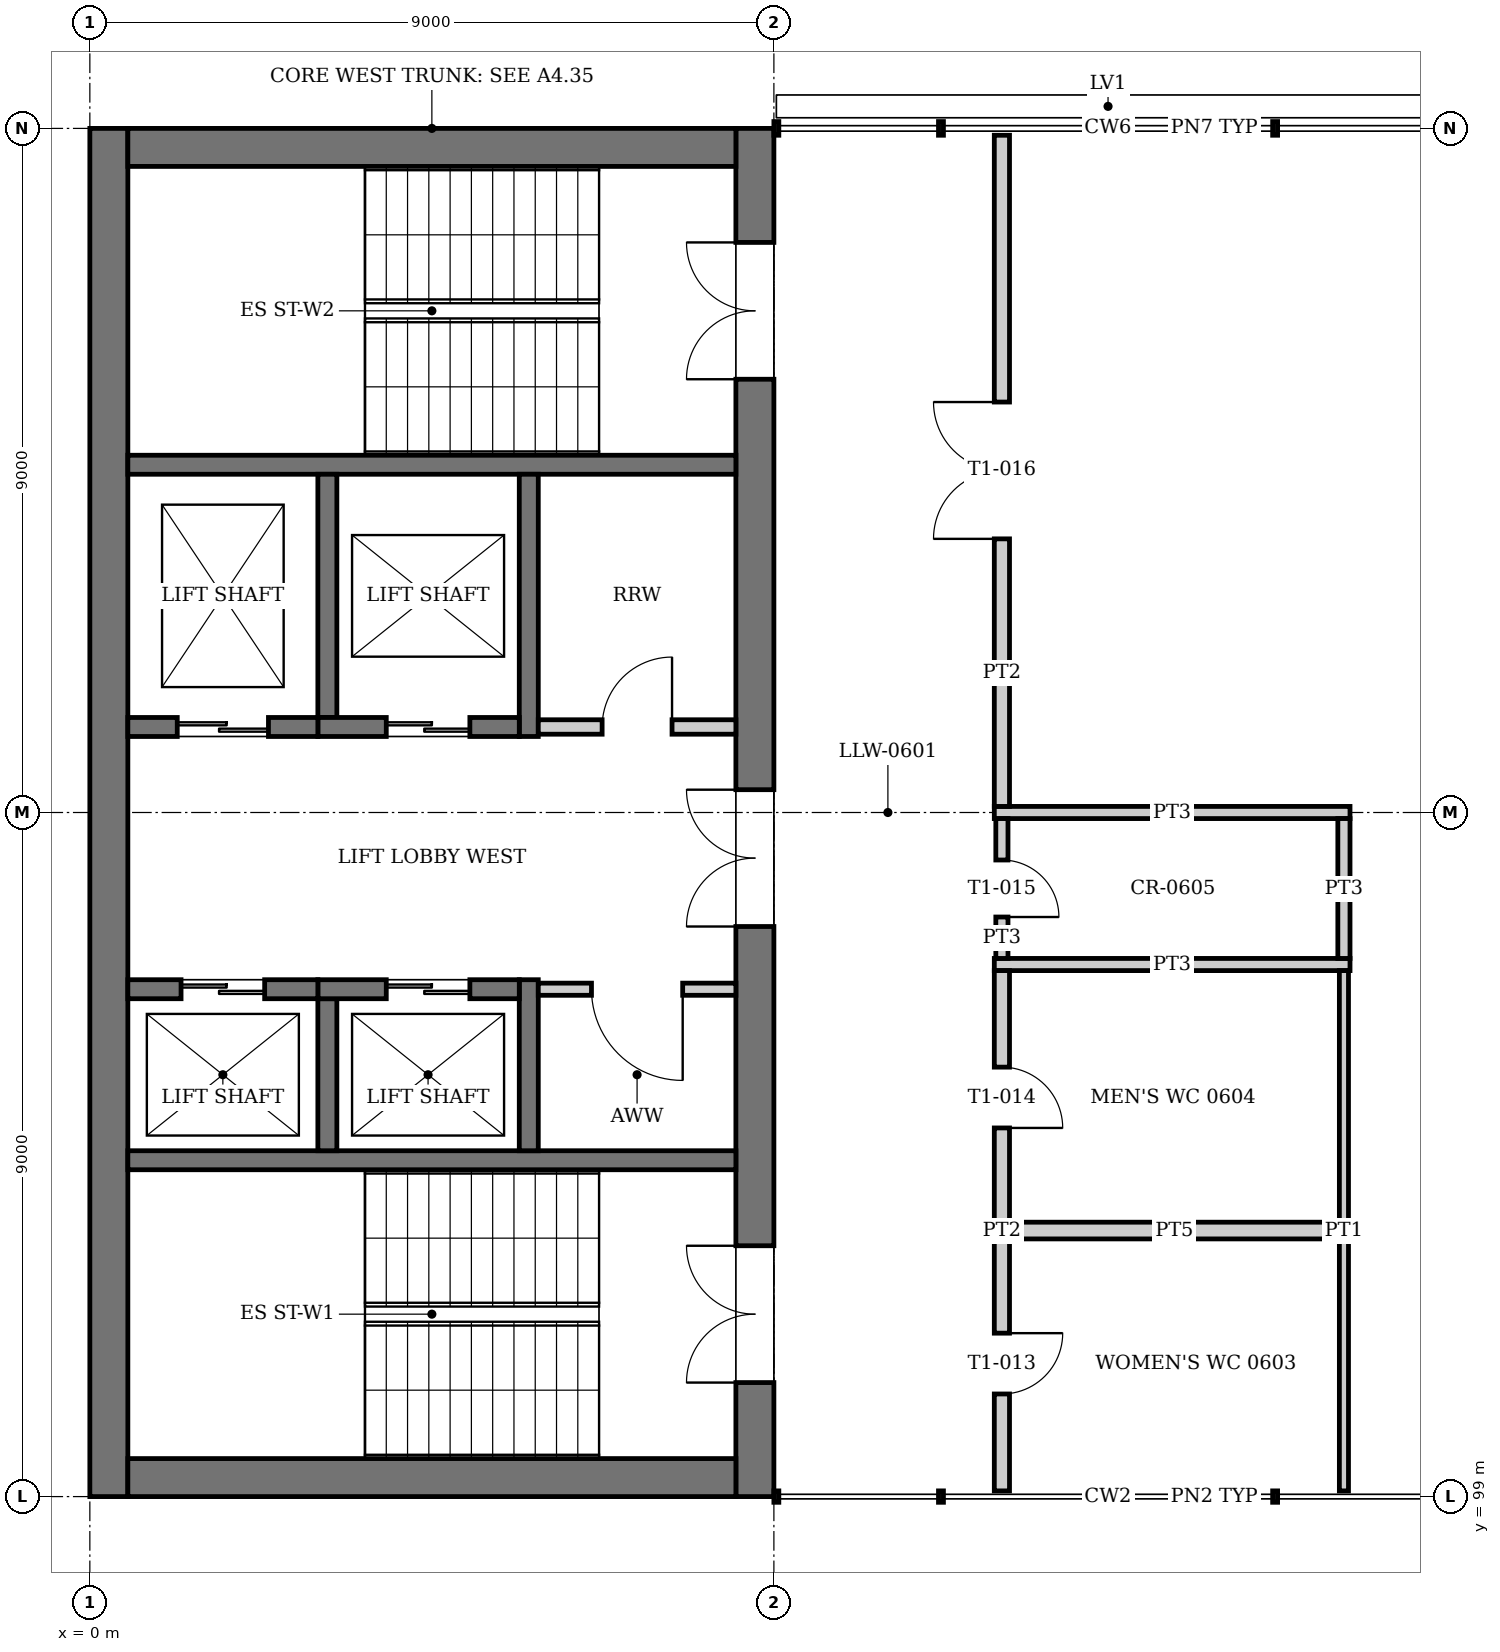
"""IFC4 building model, lengths in metres.
Left out: names, types, materials, properties, quantities, classifications, styles, units other than length and angle.
Written with IfcOpenShell. Run it as: python <this file> out.ifc"""

import sys

from ifc_helpers import new_model, si_unit, direction, frame, frame_2d, origin, place, context, subcontext, project, spatial, rectangle, extrude, element, fill, save


model = new_model("IFC4")
c1 = context("Model", 3, precision=1e-05, world=origin(), true_north=direction((0.0, 1.0)))
c2 = subcontext(c1, "Body", "Model", "MODEL_VIEW")
j1 = project(units=[si_unit("LENGTHUNIT", "METRE"), si_unit("PLANEANGLEUNIT", "RADIAN")], contexts=[c1])
p1 = place(None, origin())
s1 = spatial("IfcSite", under=j1, at=p1, CompositionType="ELEMENT")
p2 = place(p1, origin())
s2 = spatial("IfcBuilding", under=s1, at=p2, CompositionType="ELEMENT")
p3 = place(p2, frame((0.0, 0.0, 27.2)))
s3 = spatial("IfcBuildingStorey", under=s2, at=p3, CompositionType="ELEMENT", Elevation=27.2)
p4 = place(p3, frame((0.25, 99.0, 0.0), z_axis=(0.0, 0.0, 1.0), x_axis=(0.0, 1.0, 0.0)))
e1 = element("IfcWall", 1, at=p4, inside=s3, PredefinedType="SHEAR", context=c2, shape_type="SweptSolid", body=[
    extrude(rectangle(XDim=18.0, YDim=0.5, at=frame_2d((9.0, 0.0))), origin(), (0.0, 0.0, 1.0), 4.0),
])
p5 = place(p3, frame((8.75, 99.0, 0.0), z_axis=(0.0, 0.0, 1.0), x_axis=(0.0, 1.0, 0.0)))
e2 = element("IfcWall", 2, at=p5, inside=s3, PredefinedType="SHEAR", context=c2, shape_type="SweptSolid", body=[
    extrude(rectangle(XDim=18.0, YDim=0.5, at=frame_2d((9.0, 0.0))), origin(), (0.0, 0.0, 1.0), 4.0),
])
p6 = place(p5, frame((1.5, 0.0, 0.0)))
e3 = element("IfcOpeningElement", 3, at=p6, cuts=e2, PredefinedType="OPENING", context=c2, shape_type="SweptSolid", body=[
    extrude(rectangle(XDim=1.8, YDim=2.1, at=frame_2d((0.9, 1.05))), frame((0.0, 0.26, 0.0), z_axis=(0.0, -1.0, 0.0), x_axis=(1.0, 0.0, 0.0)), (0.0, 0.0, 1.0), 0.52),
])
p7 = place(p5, frame((14.7, 0.0, 0.0)))
e4 = element("IfcOpeningElement", 4, at=p7, cuts=e2, PredefinedType="OPENING", context=c2, shape_type="SweptSolid", body=[
    extrude(rectangle(XDim=1.8, YDim=2.1, at=frame_2d((0.9, 1.05))), frame((0.0, 0.26, 0.0), z_axis=(0.0, -1.0, 0.0), x_axis=(1.0, 0.0, 0.0)), (0.0, 0.0, 1.0), 0.52),
])
p8 = place(p5, frame((7.5, 0.0, 0.0)))
e5 = element("IfcOpeningElement", 5, at=p8, cuts=e2, PredefinedType="OPENING", context=c2, shape_type="SweptSolid", body=[
    extrude(rectangle(XDim=1.8, YDim=2.1, at=frame_2d((0.9, 1.05))), frame((0.0, 0.26, 0.0), z_axis=(0.0, -1.0, 0.0), x_axis=(1.0, 0.0, 0.0)), (0.0, 0.0, 1.0), 0.52),
])
for number, where, z_axis, x_axis in (
    (6, (0.5, 99.25, 0.0), (0.0, 0.0, 1.0), (1.0, 0.0, 0.0)),
    (7, (0.5, 116.75, 0.0), (0.0, 0.0, 1.0), (1.0, 0.0, 0.0)),
):
    element("IfcWall", number, at=place(p3, frame(where, z_axis=z_axis, x_axis=x_axis)), inside=s3, PredefinedType="SHEAR", context=c2, shape_type="SweptSolid", body=[
        extrude(rectangle(XDim=8.0, YDim=0.5, at=frame_2d((4.0, 0.0))), origin(), (0.0, 0.0, 1.0), 4.0),
    ])
for number, where, z_axis, x_axis in (
    (8, (8.5, 103.425, 0.0), (0.0, 0.0, 1.0), (-1.0, 0.0, 0.0)),
    (9, (8.5, 112.575, 0.0), (0.0, 0.0, 1.0), (-1.0, 0.0, 0.0)),
):
    element("IfcWall", number, at=place(p3, frame(where, z_axis=z_axis, x_axis=x_axis)), inside=s3, PredefinedType="SOLIDWALL", context=c2, shape_type="SweptSolid", body=[
        extrude(rectangle(XDim=8.0, YDim=0.25, at=frame_2d((4.0, 0.0))), origin(), (0.0, 0.0, 1.0), 3.75),
    ])
p9 = place(p3, frame((5.775, 103.55, 0.0), z_axis=(0.0, 0.0, 1.0), x_axis=(0.0, 1.0, 0.0)))
e10 = element("IfcWall", 10, at=p9, inside=s3, PredefinedType="SOLIDWALL", context=c2, shape_type="SweptSolid", body=[
    extrude(rectangle(XDim=2.25, YDim=0.25, at=frame_2d((1.125, 0.0))), origin(), (0.0, 0.0, 1.0), 4.0),
])
p10 = place(p3, frame((3.125, 103.55, 0.0), z_axis=(0.0, 0.0, 1.0), x_axis=(0.0, 1.0, 0.0)))
e11 = element("IfcWall", 11, at=p10, inside=s3, PredefinedType="SOLIDWALL", context=c2, shape_type="SweptSolid", body=[
    extrude(rectangle(XDim=2.0, YDim=0.25, at=frame_2d((1.0, 0.0))), origin(), (0.0, 0.0, 1.0), 4.0),
])
p11 = place(p3, frame((5.65, 105.675, 0.0), z_axis=(0.0, 0.0, 1.0), x_axis=(-1.0, 0.0, 0.0)))
e12 = element("IfcWall", 12, at=p11, inside=s3, PredefinedType="SOLIDWALL", context=c2, shape_type="SweptSolid", body=[
    extrude(rectangle(XDim=2.65, YDim=0.25, at=frame_2d((1.325, 0.0))), origin(), (0.0, 0.0, 1.0), 4.0),
])
p12 = place(p11, frame((0.65, 0.0, 0.0)))
e13 = element("IfcOpeningElement", 13, at=p12, cuts=e12, PredefinedType="OPENING", context=c2, shape_type="SweptSolid", body=[
    extrude(rectangle(XDim=1.1, YDim=2.1, at=frame_2d((0.55, 1.05))), frame((0.0, 0.135, 0.0), z_axis=(0.0, -1.0, 0.0), x_axis=(1.0, 0.0, 0.0)), (0.0, 0.0, 1.0), 0.27),
])
p13 = place(p3, frame((3.0, 105.675, 0.0), z_axis=(0.0, 0.0, 1.0), x_axis=(-1.0, 0.0, 0.0)))
e14 = element("IfcWall", 14, at=p13, inside=s3, PredefinedType="SOLIDWALL", context=c2, shape_type="SweptSolid", body=[
    extrude(rectangle(XDim=2.5, YDim=0.25, at=frame_2d((1.25, 0.0))), origin(), (0.0, 0.0, 1.0), 4.0),
])
p14 = place(p13, frame((0.7, 0.0, 0.0)))
e15 = element("IfcOpeningElement", 15, at=p14, cuts=e14, PredefinedType="OPENING", context=c2, shape_type="SweptSolid", body=[
    extrude(rectangle(XDim=1.1, YDim=2.1, at=frame_2d((0.55, 1.05))), frame((0.0, 0.135, 0.0), z_axis=(0.0, -1.0, 0.0), x_axis=(1.0, 0.0, 0.0)), (0.0, 0.0, 1.0), 0.27),
])
p15 = place(p3, frame((5.775, 109.0, 0.0), z_axis=(0.0, 0.0, 1.0), x_axis=(0.0, 1.0, 0.0)))
e16 = element("IfcWall", 16, at=p15, inside=s3, PredefinedType="SOLIDWALL", context=c2, shape_type="SweptSolid", body=[
    extrude(rectangle(XDim=3.45, YDim=0.25, at=frame_2d((1.725, 0.0))), origin(), (0.0, 0.0, 1.0), 4.0),
])
p16 = place(p3, frame((3.125, 109.25, 0.0), z_axis=(0.0, 0.0, 1.0), x_axis=(0.0, 1.0, 0.0)))
e17 = element("IfcWall", 17, at=p16, inside=s3, PredefinedType="SOLIDWALL", context=c2, shape_type="SweptSolid", body=[
    extrude(rectangle(XDim=3.2, YDim=0.25, at=frame_2d((1.6, 0.0))), origin(), (0.0, 0.0, 1.0), 4.0),
])
p17 = place(p3, frame((5.65, 109.125, 0.0), z_axis=(0.0, 0.0, 1.0), x_axis=(-1.0, 0.0, 0.0)))
e18 = element("IfcWall", 18, at=p17, inside=s3, PredefinedType="SOLIDWALL", context=c2, shape_type="SweptSolid", body=[
    extrude(rectangle(XDim=2.65, YDim=0.25, at=frame_2d((1.325, 0.0))), origin(), (0.0, 0.0, 1.0), 4.0),
])
p18 = place(p17, frame((0.65, 0.0, 0.0)))
e19 = element("IfcOpeningElement", 19, at=p18, cuts=e18, PredefinedType="OPENING", context=c2, shape_type="SweptSolid", body=[
    extrude(rectangle(XDim=1.1, YDim=2.1, at=frame_2d((0.55, 1.05))), frame((0.0, 0.135, 0.0), z_axis=(0.0, -1.0, 0.0), x_axis=(1.0, 0.0, 0.0)), (0.0, 0.0, 1.0), 0.27),
])
p19 = place(p3, frame((3.0, 109.125, 0.0), z_axis=(0.0, 0.0, 1.0), x_axis=(-1.0, 0.0, 0.0)))
e20 = element("IfcWall", 20, at=p19, inside=s3, PredefinedType="SOLIDWALL", context=c2, shape_type="SweptSolid", body=[
    extrude(rectangle(XDim=2.5, YDim=0.25, at=frame_2d((1.25, 0.0))), origin(), (0.0, 0.0, 1.0), 4.0),
])
p20 = place(p19, frame((0.65, 0.0, 0.0)))
e21 = element("IfcOpeningElement", 21, at=p20, cuts=e20, PredefinedType="OPENING", context=c2, shape_type="SweptSolid", body=[
    extrude(rectangle(XDim=1.2, YDim=2.1, at=frame_2d((0.6, 1.05))), frame((0.0, 0.135, 0.0), z_axis=(0.0, -1.0, 0.0), x_axis=(1.0, 0.0, 0.0)), (0.0, 0.0, 1.0), 0.27),
])
p21 = place(p3, frame((8.5, 105.675, 0.0), z_axis=(0.0, 0.0, 1.0), x_axis=(-1.0, 0.0, 0.0)))
e22 = element("IfcWall", 22, at=p21, inside=s3, PredefinedType="PARTITIONING", context=c2, shape_type="SweptSolid", body=[
    extrude(rectangle(XDim=2.6, YDim=0.16, at=frame_2d((1.3, 0.0))), origin(), (0.0, 0.0, 1.0), 3.75),
])
p22 = place(p21, frame((0.7, 0.0, 0.0)))
e23 = element("IfcOpeningElement", 23, at=p22, cuts=e22, PredefinedType="OPENING", context=c2, shape_type="SweptSolid", body=[
    extrude(rectangle(XDim=1.2, YDim=2.1, at=frame_2d((0.6, 1.05))), frame((0.0, 0.09, 0.0), z_axis=(0.0, -1.0, 0.0), x_axis=(1.0, 0.0, 0.0)), (0.0, 0.0, 1.0), 0.18),
])
p23 = place(p3, frame((8.5, 109.125, 0.0), z_axis=(0.0, 0.0, 1.0), x_axis=(-1.0, 0.0, 0.0)))
e24 = element("IfcWall", 24, at=p23, inside=s3, PredefinedType="PARTITIONING", context=c2, shape_type="SweptSolid", body=[
    extrude(rectangle(XDim=2.6, YDim=0.19, at=frame_2d((1.3, 0.0))), origin(), (0.0, 0.0, 1.0), 3.75),
])
p24 = place(p23, frame((0.84, 0.0, 0.0)))
e25 = element("IfcOpeningElement", 25, at=p24, cuts=e24, PredefinedType="OPENING", context=c2, shape_type="SweptSolid", body=[
    extrude(rectangle(XDim=0.92, YDim=2.1, at=frame_2d((0.46, 1.05))), frame((0.0, 0.105, 0.0), z_axis=(0.0, -1.0, 0.0), x_axis=(1.0, 0.0, 0.0)), (0.0, 0.0, 1.0), 0.21),
])
p25 = place(p3, frame((12.1, 102.5, 0.0), z_axis=(0.0, 0.0, 1.0), x_axis=(1.0, 0.0, 0.0)))
e26 = element("IfcWall", 26, at=p25, inside=s3, PredefinedType="PLUMBINGWALL", context=c2, shape_type="SweptSolid", body=[
    extrude(rectangle(XDim=4.34, YDim=0.22, at=frame_2d((2.17, 0.0))), origin(), (0.0, 0.0, 1.0), 3.05),
])
for number, where, z_axis, x_axis in (
    (27, (11.9, 106.0, 0.0), (0.0, 0.0, 1.0), (1.0, 0.0, 0.0)),
    (28, (11.9, 108.0, 0.0), (0.0, 0.0, 1.0), (1.0, 0.0, 0.0)),
):
    element("IfcWall", number, at=place(p3, frame(where, z_axis=z_axis, x_axis=x_axis)), inside=s3, PredefinedType="PARTITIONING", context=c2, shape_type="SweptSolid", body=[
        extrude(rectangle(XDim=4.68, YDim=0.16, at=frame_2d((2.34, 0.0))), origin(), (0.0, 0.0, 1.0), 3.05),
    ])
p26 = place(p3, frame((12.0, 99.075, 0.0), z_axis=(0.0, 0.0, 1.0), x_axis=(0.0, 1.0, 0.0)))
e29 = element("IfcWall", 29, at=p26, inside=s3, PredefinedType="PARTITIONING", context=c2, shape_type="SweptSolid", body=[
    extrude(rectangle(XDim=6.845, YDim=0.2, at=frame_2d((3.422, 0.0))), origin(), (0.0, 0.0, 1.0), 3.85),
])
p27 = place(p26, frame((1.275, 0.0, 0.0)))
e30 = element("IfcOpeningElement", 30, at=p27, cuts=e29, PredefinedType="OPENING", context=c2, shape_type="SweptSolid", body=[
    extrude(rectangle(XDim=0.8, YDim=2.1, at=frame_2d((0.4, 1.05))), frame((0.0, 0.11, 0.0), z_axis=(0.0, -1.0, 0.0), x_axis=(1.0, 0.0, 0.0)), (0.0, 0.0, 1.0), 0.22),
])
p28 = place(p26, frame((4.775, 0.0, 0.0)))
e31 = element("IfcOpeningElement", 31, at=p28, cuts=e29, PredefinedType="OPENING", context=c2, shape_type="SweptSolid", body=[
    extrude(rectangle(XDim=0.8, YDim=2.1, at=frame_2d((0.4, 1.05))), frame((0.0, 0.11, 0.0), z_axis=(0.0, -1.0, 0.0), x_axis=(1.0, 0.0, 0.0)), (0.0, 0.0, 1.0), 0.22),
])
p29 = place(p3, frame((12.0, 106.08, 0.0), z_axis=(0.0, 0.0, 1.0), x_axis=(0.0, 1.0, 0.0)))
e32 = element("IfcWall", 32, at=p29, inside=s3, PredefinedType="PARTITIONING", context=c2, shape_type="SweptSolid", body=[
    extrude(rectangle(XDim=1.84, YDim=0.16, at=frame_2d((0.92, 0.0))), origin(), (0.0, 0.0, 1.0), 3.85),
])
p30 = place(p29, frame((0.545, 0.0, 0.0)))
e33 = element("IfcOpeningElement", 33, at=p30, cuts=e32, PredefinedType="OPENING", context=c2, shape_type="SweptSolid", body=[
    extrude(rectangle(XDim=0.75, YDim=2.1, at=frame_2d((0.375, 1.05))), frame((0.0, 0.09, 0.0), z_axis=(0.0, -1.0, 0.0), x_axis=(1.0, 0.0, 0.0)), (0.0, 0.0, 1.0), 0.18),
])
p31 = place(p3, frame((12.0, 108.08, 0.0), z_axis=(0.0, 0.0, 1.0), x_axis=(0.0, 1.0, 0.0)))
e34 = element("IfcWall", 34, at=p31, inside=s3, PredefinedType="PARTITIONING", context=c2, shape_type="SweptSolid", body=[
    extrude(rectangle(XDim=8.83, YDim=0.2, at=frame_2d((4.415, 0.0))), origin(), (0.0, 0.0, 1.0), 3.85),
])
p32 = place(p31, frame((3.52, 0.0, 0.0)))
e35 = element("IfcOpeningElement", 35, at=p32, cuts=e34, PredefinedType="OPENING", context=c2, shape_type="SweptSolid", body=[
    extrude(rectangle(XDim=1.8, YDim=2.1, at=frame_2d((0.9, 1.05))), frame((0.0, 0.11, 0.0), z_axis=(0.0, -1.0, 0.0), x_axis=(1.0, 0.0, 0.0)), (0.0, 0.0, 1.0), 0.22),
])
p33 = place(p3, frame((16.5, 99.075, 0.0), z_axis=(0.0, 0.0, 1.0), x_axis=(0.0, 1.0, 0.0)))
e36 = element("IfcWall", 36, at=p33, inside=s3, PredefinedType="PARTITIONING", context=c2, shape_type="SweptSolid", body=[
    extrude(rectangle(XDim=6.845, YDim=0.12, at=frame_2d((3.422, 0.0))), origin(), (0.0, 0.0, 1.0), 3.85),
])
p34 = place(p3, frame((16.5, 106.08, 0.0), z_axis=(0.0, 0.0, 1.0), x_axis=(0.0, 1.0, 0.0)))
e37 = element("IfcWall", 37, at=p34, inside=s3, PredefinedType="PARTITIONING", context=c2, shape_type="SweptSolid", body=[
    extrude(rectangle(XDim=1.84, YDim=0.16, at=frame_2d((0.92, 0.0))), origin(), (0.0, 0.0, 1.0), 3.85),
])
p35 = place(p12, origin())
e38 = element("IfcDoor", 38, at=p35, inside=s3, OperationType="DOUBLE_DOOR_SLIDING", PredefinedType="DOOR", context=c2, shape_type="SweptSolid", body=[
    extrude(rectangle(XDim=1.1, YDim=2.1, at=frame_2d((0.55, 1.05))), frame((0.0, 0.025, 0.0), z_axis=(0.0, -1.0, 0.0), x_axis=(1.0, 0.0, 0.0)), (0.0, 0.0, 1.0), 0.05),
])
fill(e13, e38)
p36 = place(p14, origin())
e39 = element("IfcDoor", 39, at=p36, inside=s3, OperationType="DOUBLE_DOOR_SLIDING", PredefinedType="DOOR", context=c2, shape_type="SweptSolid", body=[
    extrude(rectangle(XDim=1.1, YDim=2.1, at=frame_2d((0.55, 1.05))), frame((0.0, 0.025, 0.0), z_axis=(0.0, -1.0, 0.0), x_axis=(1.0, 0.0, 0.0)), (0.0, 0.0, 1.0), 0.05),
])
fill(e15, e39)
p37 = place(p18, origin())
e40 = element("IfcDoor", 40, at=p37, inside=s3, OperationType="DOUBLE_DOOR_SLIDING", PredefinedType="DOOR", context=c2, shape_type="SweptSolid", body=[
    extrude(rectangle(XDim=1.1, YDim=2.1, at=frame_2d((0.55, 1.05))), frame((0.0, 0.025, 0.0), z_axis=(0.0, -1.0, 0.0), x_axis=(1.0, 0.0, 0.0)), (0.0, 0.0, 1.0), 0.05),
])
fill(e19, e40)
p38 = place(p20, origin())
e41 = element("IfcDoor", 41, at=p38, inside=s3, OperationType="DOUBLE_DOOR_SLIDING", PredefinedType="DOOR", context=c2, shape_type="SweptSolid", body=[
    extrude(rectangle(XDim=1.2, YDim=2.1, at=frame_2d((0.6, 1.05))), frame((0.0, 0.025, 0.0), z_axis=(0.0, -1.0, 0.0), x_axis=(1.0, 0.0, 0.0)), (0.0, 0.0, 1.0), 0.05),
])
fill(e21, e41)
p39 = place(p27, frame((0.8, 0.0, 0.0), z_axis=(0.0, 0.0, 1.0), x_axis=(-1.0, 0.0, 0.0)))
e42 = element("IfcDoor", 42, at=p39, inside=s3, OperationType="SINGLE_SWING_LEFT", PredefinedType="DOOR", context=c2, shape_type="SweptSolid", body=[
    extrude(rectangle(XDim=0.8, YDim=2.1, at=frame_2d((0.4, 1.05))), frame((0.0, 0.025, 0.0), z_axis=(0.0, -1.0, 0.0), x_axis=(1.0, 0.0, 0.0)), (0.0, 0.0, 1.0), 0.05),
])
fill(e30, e42)
p40 = place(p28, frame((0.8, 0.0, 0.0), z_axis=(0.0, 0.0, 1.0), x_axis=(-1.0, 0.0, 0.0)))
e43 = element("IfcDoor", 43, at=p40, inside=s3, OperationType="SINGLE_SWING_RIGHT", PredefinedType="DOOR", context=c2, shape_type="SweptSolid", body=[
    extrude(rectangle(XDim=0.8, YDim=2.1, at=frame_2d((0.4, 1.05))), frame((0.0, 0.025, 0.0), z_axis=(0.0, -1.0, 0.0), x_axis=(1.0, 0.0, 0.0)), (0.0, 0.0, 1.0), 0.05),
])
fill(e31, e43)
p41 = place(p30, frame((0.75, 0.0, 0.0), z_axis=(0.0, 0.0, 1.0), x_axis=(-1.0, 0.0, 0.0)))
e44 = element("IfcDoor", 44, at=p41, inside=s3, OperationType="SINGLE_SWING_RIGHT", PredefinedType="DOOR", context=c2, shape_type="SweptSolid", body=[
    extrude(rectangle(XDim=0.75, YDim=2.1, at=frame_2d((0.375, 1.05))), frame((0.0, 0.025, 0.0), z_axis=(0.0, -1.0, 0.0), x_axis=(1.0, 0.0, 0.0)), (0.0, 0.0, 1.0), 0.05),
])
fill(e33, e44)
p42 = place(p32, origin())
e45 = element("IfcDoor", 45, at=p42, inside=s3, OperationType="DOUBLE_DOOR_SINGLE_SWING", PredefinedType="DOOR", context=c2, shape_type="SweptSolid", body=[
    extrude(rectangle(XDim=1.8, YDim=2.1, at=frame_2d((0.9, 1.05))), frame((0.0, 0.025, 0.0), z_axis=(0.0, -1.0, 0.0), x_axis=(1.0, 0.0, 0.0)), (0.0, 0.0, 1.0), 0.05),
])
fill(e35, e45)
p43 = place(p6, origin())
e46 = element("IfcDoor", 46, at=p43, inside=s3, OperationType="DOUBLE_DOOR_SINGLE_SWING", PredefinedType="DOOR", context=c2, shape_type="SweptSolid", body=[
    extrude(rectangle(XDim=1.8, YDim=2.1, at=frame_2d((0.9, 1.05))), frame((0.0, 0.025, 0.0), z_axis=(0.0, -1.0, 0.0), x_axis=(1.0, 0.0, 0.0)), (0.0, 0.0, 1.0), 0.05),
])
fill(e3, e46)
p44 = place(p7, origin())
e47 = element("IfcDoor", 47, at=p44, inside=s3, OperationType="DOUBLE_DOOR_SINGLE_SWING", PredefinedType="DOOR", context=c2, shape_type="SweptSolid", body=[
    extrude(rectangle(XDim=1.8, YDim=2.1, at=frame_2d((0.9, 1.05))), frame((0.0, 0.025, 0.0), z_axis=(0.0, -1.0, 0.0), x_axis=(1.0, 0.0, 0.0)), (0.0, 0.0, 1.0), 0.05),
])
fill(e4, e47)
p45 = place(p8, origin())
e48 = element("IfcDoor", 48, at=p45, inside=s3, OperationType="DOUBLE_DOOR_SINGLE_SWING", PredefinedType="DOOR", context=c2, shape_type="SweptSolid", body=[
    extrude(rectangle(XDim=1.8, YDim=2.1, at=frame_2d((0.9, 1.05))), frame((0.0, 0.025, 0.0), z_axis=(0.0, -1.0, 0.0), x_axis=(1.0, 0.0, 0.0)), (0.0, 0.0, 1.0), 0.05),
])
fill(e5, e48)
p46 = place(p22, origin())
e49 = element("IfcDoor", 49, at=p46, inside=s3, OperationType="SINGLE_SWING_LEFT", PredefinedType="DOOR", context=c2, shape_type="SweptSolid", body=[
    extrude(rectangle(XDim=1.2, YDim=2.1, at=frame_2d((0.6, 1.05))), frame((0.0, 0.025, 0.0), z_axis=(0.0, -1.0, 0.0), x_axis=(1.0, 0.0, 0.0)), (0.0, 0.0, 1.0), 0.05),
])
fill(e23, e49)
p47 = place(p24, frame((0.92, 0.0, 0.0), z_axis=(0.0, 0.0, 1.0), x_axis=(-1.0, 0.0, 0.0)))
e50 = element("IfcDoor", 50, at=p47, inside=s3, OperationType="SINGLE_SWING_RIGHT", PredefinedType="DOOR", context=c2, shape_type="SweptSolid", body=[
    extrude(rectangle(XDim=0.92, YDim=2.1, at=frame_2d((0.46, 1.05))), frame((0.0, 0.025, 0.0), z_axis=(0.0, -1.0, 0.0), x_axis=(1.0, 0.0, 0.0)), (0.0, 0.0, 1.0), 0.05),
])
fill(e25, e50)
save(model, sys.argv[1])
